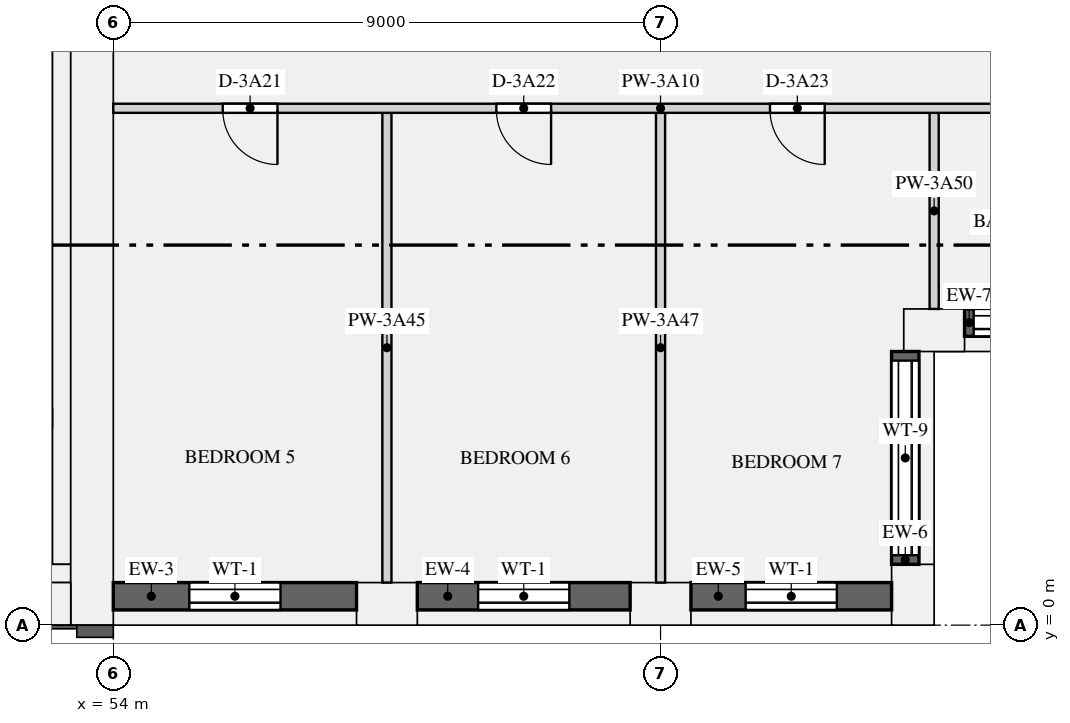
"""IFC4 building model, lengths in metres.
Left out: names, types, materials, properties, quantities, classifications, styles, units other than length and angle.
Written with IfcOpenShell. Run it as: python <this file> out.ifc"""

import sys

from ifc_helpers import new_model, si_unit, direction, frame, frame_2d, origin, origin_2d, place, context, subcontext, project, spatial, rectangle, extrude, element, fill, save


model = new_model("IFC4")
c1 = context("Model", 3, precision=1e-05, world=origin(), true_north=direction((0.0, 1.0)))
c2 = subcontext(c1, "Body", "Model", "MODEL_VIEW")
j1 = project(units=[si_unit("LENGTHUNIT", "METRE"), si_unit("PLANEANGLEUNIT", "RADIAN")], contexts=[c1])
p1 = place(None, origin())
s1 = spatial("IfcSite", under=j1, at=p1, CompositionType="ELEMENT")
p2 = place(p1, origin())
s2 = spatial("IfcBuilding", under=s1, at=p2, CompositionType="ELEMENT")
p3 = place(p2, frame((0.0, 0.0, 144.45)))
s3 = spatial("IfcBuildingStorey", under=s2, at=p3, CompositionType="ELEMENT", Elevation=144.45)
for number, where, z_axis, x_axis in (
    (1, (58.5, 0.35, 0.0), (0.0, 0.0, 1.0), (1.0, 0.0, 0.0)),
    (2, (63.0, 0.35, 0.0), (0.0, 0.0, 1.0), (1.0, 0.0, 0.0)),
    (3, (67.15, 0.5, 0.0), (0.0, 0.0, 1.0), (0.0, 1.0, 0.0)),
    (4, (67.5, 4.85, 0.0), (0.0, 0.0, 1.0), (1.0, 0.0, 0.0)),
):
    element("IfcColumn", number, at=place(p3, frame(where, z_axis=z_axis, x_axis=x_axis)), inside=s3, PredefinedType="USERDEFINED", context=c2, shape_type="SweptSolid", body=[
        extrude(rectangle(XDim=1.0, YDim=0.7, at=origin_2d()), origin(), (0.0, 0.0, 1.0), 3.15),
    ])
p4 = place(p3, frame((53.65, 0.0, 0.0), z_axis=(0.0, 0.0, 1.0), x_axis=(0.0, 1.0, 0.0)))
e5 = element("IfcWall", 5, at=p4, inside=s3, PredefinedType="SHEAR", context=c2, shape_type="SweptSolid", body=[
    extrude(rectangle(XDim=12.5, YDim=0.7, at=frame_2d((6.25, 0.0))), origin(), (0.0, 0.0, 1.0), 3.15),
])
p5 = place(p3, frame((18.7, 0.35, 0.0), z_axis=(0.0, 0.0, 1.0), x_axis=(1.0, 0.0, 0.0)))
e6 = element("IfcWall", 6, at=p5, inside=s3, PredefinedType="SHEAR", context=c2, shape_type="SweptSolid", body=[
    extrude(rectangle(XDim=34.6, YDim=0.7, at=frame_2d((17.3, 0.0))), origin(), (0.0, 0.0, 1.0), 3.15),
])
p6 = place(p3, frame((53.15, 1.0, 0.0), z_axis=(0.0, 0.0, 1.0), x_axis=(0.0, 1.0, 0.0)))
e7 = element("IfcWall", 7, at=p6, inside=s3, PredefinedType="SHEAR", context=c2, shape_type="SweptSolid", body=[
    extrude(rectangle(XDim=10.9, YDim=0.3, at=frame_2d((5.45, 0.0))), origin(), (0.0, 0.0, 1.0), 3.15),
])
p7 = place(p3, frame((18.7, 0.85, 0.0), z_axis=(0.0, 0.0, 1.0), x_axis=(1.0, 0.0, 0.0)))
e8 = element("IfcWall", 8, at=p7, inside=s3, PredefinedType="SHEAR", context=c2, shape_type="SweptSolid", body=[
    extrude(rectangle(XDim=34.6, YDim=0.3, at=frame_2d((17.3, 0.0))), origin(), (0.0, 0.0, 1.0), 3.15),
])
p8 = place(p3, frame((54.0, 0.475, 0.9), z_axis=(0.0, 0.0, 1.0), x_axis=(1.0, 0.0, 0.0)))
e9 = element("IfcWall", 9, at=p8, inside=s3, PredefinedType="SOLIDWALL", context=c2, shape_type="SweptSolid", body=[
    extrude(rectangle(XDim=4.0, YDim=0.45, at=frame_2d((2.0, 0.0))), origin(), (0.0, 0.0, 1.0), 1.93),
])
p9 = place(p8, frame((1.25, 0.0, 0.15)))
e10 = element("IfcOpeningElement", 10, at=p9, cuts=e9, PredefinedType="OPENING", context=c2, shape_type="SweptSolid", body=[
    extrude(rectangle(XDim=1.5, YDim=1.5, at=frame_2d((0.75, 0.75))), frame((0.0, 0.235, 0.0), z_axis=(0.0, -1.0, 0.0), x_axis=(1.0, 0.0, 0.0)), (0.0, 0.0, 1.0), 0.47),
])
p10 = place(p3, frame((59.0, 0.475, 0.9), z_axis=(0.0, 0.0, 1.0), x_axis=(1.0, 0.0, 0.0)))
e11 = element("IfcWall", 11, at=p10, inside=s3, PredefinedType="SOLIDWALL", context=c2, shape_type="SweptSolid", body=[
    extrude(rectangle(XDim=3.5, YDim=0.45, at=frame_2d((1.75, 0.0))), origin(), (0.0, 0.0, 1.0), 1.93),
])
p11 = place(p10, frame((1.0, 0.0, 0.15)))
e12 = element("IfcOpeningElement", 12, at=p11, cuts=e11, PredefinedType="OPENING", context=c2, shape_type="SweptSolid", body=[
    extrude(rectangle(XDim=1.5, YDim=1.5, at=frame_2d((0.75, 0.75))), frame((0.0, 0.235, 0.0), z_axis=(0.0, -1.0, 0.0), x_axis=(1.0, 0.0, 0.0)), (0.0, 0.0, 1.0), 0.47),
])
p12 = place(p3, frame((63.5, 0.475, 0.9), z_axis=(0.0, 0.0, 1.0), x_axis=(1.0, 0.0, 0.0)))
e13 = element("IfcWall", 13, at=p12, inside=s3, PredefinedType="SOLIDWALL", context=c2, shape_type="SweptSolid", body=[
    extrude(rectangle(XDim=3.3, YDim=0.45, at=frame_2d((1.65, 0.0))), origin(), (0.0, 0.0, 1.0), 1.93),
])
p13 = place(p12, frame((0.9, 0.0, 0.15)))
e14 = element("IfcOpeningElement", 14, at=p13, cuts=e13, PredefinedType="OPENING", context=c2, shape_type="SweptSolid", body=[
    extrude(rectangle(XDim=1.5, YDim=1.5, at=frame_2d((0.75, 0.75))), frame((0.0, 0.235, 0.0), z_axis=(0.0, -1.0, 0.0), x_axis=(1.0, 0.0, 0.0)), (0.0, 0.0, 1.0), 0.47),
])
p14 = place(p3, frame((67.025, 1.0, 0.9), z_axis=(0.0, 0.0, 1.0), x_axis=(0.0, 1.0, 0.0)))
e15 = element("IfcWall", 15, at=p14, inside=s3, PredefinedType="SOLIDWALL", context=c2, shape_type="SweptSolid", body=[
    extrude(rectangle(XDim=3.5, YDim=0.45, at=frame_2d((1.75, 0.0))), origin(), (0.0, 0.0, 1.0), 1.93),
])
p15 = place(p14, frame((0.15, 0.0, 0.15)))
e16 = element("IfcOpeningElement", 16, at=p15, cuts=e15, PredefinedType="OPENING", context=c2, shape_type="SweptSolid", body=[
    extrude(rectangle(XDim=3.2, YDim=1.5, at=frame_2d((1.6, 0.75))), frame((0.0, 0.235, 0.0), z_axis=(0.0, -1.0, 0.0), x_axis=(1.0, 0.0, 0.0)), (0.0, 0.0, 1.0), 0.47),
])
p16 = place(p3, frame((68.0, 4.975, 0.9), z_axis=(0.0, 0.0, 1.0), x_axis=(1.0, 0.0, 0.0)))
e17 = element("IfcWall", 17, at=p16, inside=s3, PredefinedType="SOLIDWALL", context=c2, shape_type="SweptSolid", body=[
    extrude(rectangle(XDim=3.3, YDim=0.45, at=frame_2d((1.65, 0.0))), origin(), (0.0, 0.0, 1.0), 1.93),
])
p17 = place(p16, frame((0.15, 0.0, 0.15)))
e18 = element("IfcOpeningElement", 18, at=p17, cuts=e17, PredefinedType="OPENING", context=c2, shape_type="SweptSolid", body=[
    extrude(rectangle(XDim=3.0, YDim=1.5, at=frame_2d((1.5, 0.75))), frame((0.0, 0.235, 0.0), z_axis=(0.0, -1.0, 0.0), x_axis=(1.0, 0.0, 0.0)), (0.0, 0.0, 1.0), 0.47),
])
p18 = place(p3, frame((54.0, 8.5, 0.0), z_axis=(0.0, 0.0, 1.0), x_axis=(1.0, 0.0, 0.0)))
e19 = element("IfcWall", 19, at=p18, inside=s3, PredefinedType="PARTITIONING", context=c2, shape_type="SweptSolid", body=[
    extrude(rectangle(XDim=17.3, YDim=0.15, at=frame_2d((8.65, 0.0))), origin(), (0.0, 0.0, 1.0), 2.83),
])
p19 = place(p18, frame((1.8, 0.0, 0.0)))
e20 = element("IfcOpeningElement", 20, at=p19, cuts=e19, PredefinedType="OPENING", context=c2, shape_type="SweptSolid", body=[
    extrude(rectangle(XDim=0.9, YDim=2.1, at=frame_2d((0.45, 1.05))), frame((0.0, 0.085, 0.0), z_axis=(0.0, -1.0, 0.0), x_axis=(1.0, 0.0, 0.0)), (0.0, 0.0, 1.0), 0.17),
])
p20 = place(p18, frame((6.3, 0.0, 0.0)))
e21 = element("IfcOpeningElement", 21, at=p20, cuts=e19, PredefinedType="OPENING", context=c2, shape_type="SweptSolid", body=[
    extrude(rectangle(XDim=0.9, YDim=2.1, at=frame_2d((0.45, 1.05))), frame((0.0, 0.085, 0.0), z_axis=(0.0, -1.0, 0.0), x_axis=(1.0, 0.0, 0.0)), (0.0, 0.0, 1.0), 0.17),
])
p21 = place(p18, frame((10.8, 0.0, 0.0)))
e22 = element("IfcOpeningElement", 22, at=p21, cuts=e19, PredefinedType="OPENING", context=c2, shape_type="SweptSolid", body=[
    extrude(rectangle(XDim=0.9, YDim=2.1, at=frame_2d((0.45, 1.05))), frame((0.0, 0.085, 0.0), z_axis=(0.0, -1.0, 0.0), x_axis=(1.0, 0.0, 0.0)), (0.0, 0.0, 1.0), 0.17),
])
p22 = place(p18, frame((15.025, 0.0, 0.0)))
e23 = element("IfcOpeningElement", 23, at=p22, cuts=e19, PredefinedType="OPENING", context=c2, shape_type="SweptSolid", body=[
    extrude(rectangle(XDim=0.9, YDim=2.1, at=frame_2d((0.45, 1.05))), frame((0.0, 0.085, 0.0), z_axis=(0.0, -1.0, 0.0), x_axis=(1.0, 0.0, 0.0)), (0.0, 0.0, 1.0), 0.17),
])
for number, where, z_axis, x_axis in (
    (24, (58.5, 0.7, 0.0), (0.0, 0.0, 1.0), (0.0, 1.0, 0.0)),
    (25, (63.0, 0.7, 0.0), (0.0, 0.0, 1.0), (0.0, 1.0, 0.0)),
):
    element("IfcWall", number, at=place(p3, frame(where, z_axis=z_axis, x_axis=x_axis)), inside=s3, PredefinedType="PARTITIONING", context=c2, shape_type="SweptSolid", body=[
        extrude(rectangle(XDim=7.725, YDim=0.15, at=frame_2d((3.863, 0.0))), origin(), (0.0, 0.0, 1.0), 2.83),
    ])
p23 = place(p3, frame((67.5, 5.2, 0.0), z_axis=(0.0, 0.0, 1.0), x_axis=(0.0, 1.0, 0.0)))
e26 = element("IfcWall", 26, at=p23, inside=s3, PredefinedType="PARTITIONING", context=c2, shape_type="SweptSolid", body=[
    extrude(rectangle(XDim=3.225, YDim=0.15, at=frame_2d((1.613, 0.0))), origin(), (0.0, 0.0, 1.0), 2.83),
])
p24 = place(p9, origin())
e27 = element("IfcWindow", 27, at=p24, inside=s3, PartitioningType="SINGLE_PANEL", PredefinedType="WINDOW", context=c2, shape_type="SweptSolid", body=[
    extrude(rectangle(XDim=1.5, YDim=1.5, at=frame_2d((0.75, 0.75))), frame((0.0, -0.065, 0.0), z_axis=(0.0, -1.0, 0.0), x_axis=(1.0, 0.0, 0.0)), (0.0, 0.0, 1.0), 0.06),
])
fill(e10, e27)
p25 = place(p11, origin())
e28 = element("IfcWindow", 28, at=p25, inside=s3, PartitioningType="SINGLE_PANEL", PredefinedType="WINDOW", context=c2, shape_type="SweptSolid", body=[
    extrude(rectangle(XDim=1.5, YDim=1.5, at=frame_2d((0.75, 0.75))), frame((0.0, -0.065, 0.0), z_axis=(0.0, -1.0, 0.0), x_axis=(1.0, 0.0, 0.0)), (0.0, 0.0, 1.0), 0.06),
])
fill(e12, e28)
p26 = place(p13, origin())
e29 = element("IfcWindow", 29, at=p26, inside=s3, PartitioningType="SINGLE_PANEL", PredefinedType="WINDOW", context=c2, shape_type="SweptSolid", body=[
    extrude(rectangle(XDim=1.5, YDim=1.5, at=frame_2d((0.75, 0.75))), frame((0.0, -0.065, 0.0), z_axis=(0.0, -1.0, 0.0), x_axis=(1.0, 0.0, 0.0)), (0.0, 0.0, 1.0), 0.06),
])
fill(e14, e29)
p27 = place(p15, origin())
e30 = element("IfcWindow", 30, at=p27, inside=s3, PartitioningType="SINGLE_PANEL", PredefinedType="WINDOW", context=c2, shape_type="SweptSolid", body=[
    extrude(rectangle(XDim=3.2, YDim=1.5, at=frame_2d((1.6, 0.75))), frame((0.0, -0.065, 0.0), z_axis=(0.0, -1.0, 0.0), x_axis=(1.0, 0.0, 0.0)), (0.0, 0.0, 1.0), 0.06),
])
fill(e16, e30)
p28 = place(p17, origin())
e31 = element("IfcWindow", 31, at=p28, inside=s3, PartitioningType="SINGLE_PANEL", PredefinedType="WINDOW", context=c2, shape_type="SweptSolid", body=[
    extrude(rectangle(XDim=3.0, YDim=1.5, at=frame_2d((1.5, 0.75))), frame((0.0, -0.065, 0.0), z_axis=(0.0, -1.0, 0.0), x_axis=(1.0, 0.0, 0.0)), (0.0, 0.0, 1.0), 0.06),
])
fill(e18, e31)
p29 = place(p19, frame((0.9, 0.0, 0.0), z_axis=(0.0, 0.0, 1.0), x_axis=(-1.0, 0.0, 0.0)))
e32 = element("IfcDoor", 32, at=p29, inside=s3, OperationType="SINGLE_SWING_LEFT", PredefinedType="DOOR", context=c2, shape_type="SweptSolid", body=[
    extrude(rectangle(XDim=0.9, YDim=2.1, at=frame_2d((0.45, 1.05))), frame((0.0, 0.025, 0.0), z_axis=(0.0, -1.0, 0.0), x_axis=(1.0, 0.0, 0.0)), (0.0, 0.0, 1.0), 0.05),
])
fill(e20, e32)
p30 = place(p20, frame((0.9, 0.0, 0.0), z_axis=(0.0, 0.0, 1.0), x_axis=(-1.0, 0.0, 0.0)))
e33 = element("IfcDoor", 33, at=p30, inside=s3, OperationType="SINGLE_SWING_LEFT", PredefinedType="DOOR", context=c2, shape_type="SweptSolid", body=[
    extrude(rectangle(XDim=0.9, YDim=2.1, at=frame_2d((0.45, 1.05))), frame((0.0, 0.025, 0.0), z_axis=(0.0, -1.0, 0.0), x_axis=(1.0, 0.0, 0.0)), (0.0, 0.0, 1.0), 0.05),
])
fill(e21, e33)
p31 = place(p21, frame((0.9, 0.0, 0.0), z_axis=(0.0, 0.0, 1.0), x_axis=(-1.0, 0.0, 0.0)))
e34 = element("IfcDoor", 34, at=p31, inside=s3, OperationType="SINGLE_SWING_LEFT", PredefinedType="DOOR", context=c2, shape_type="SweptSolid", body=[
    extrude(rectangle(XDim=0.9, YDim=2.1, at=frame_2d((0.45, 1.05))), frame((0.0, 0.025, 0.0), z_axis=(0.0, -1.0, 0.0), x_axis=(1.0, 0.0, 0.0)), (0.0, 0.0, 1.0), 0.05),
])
fill(e22, e34)
save(model, sys.argv[1])
